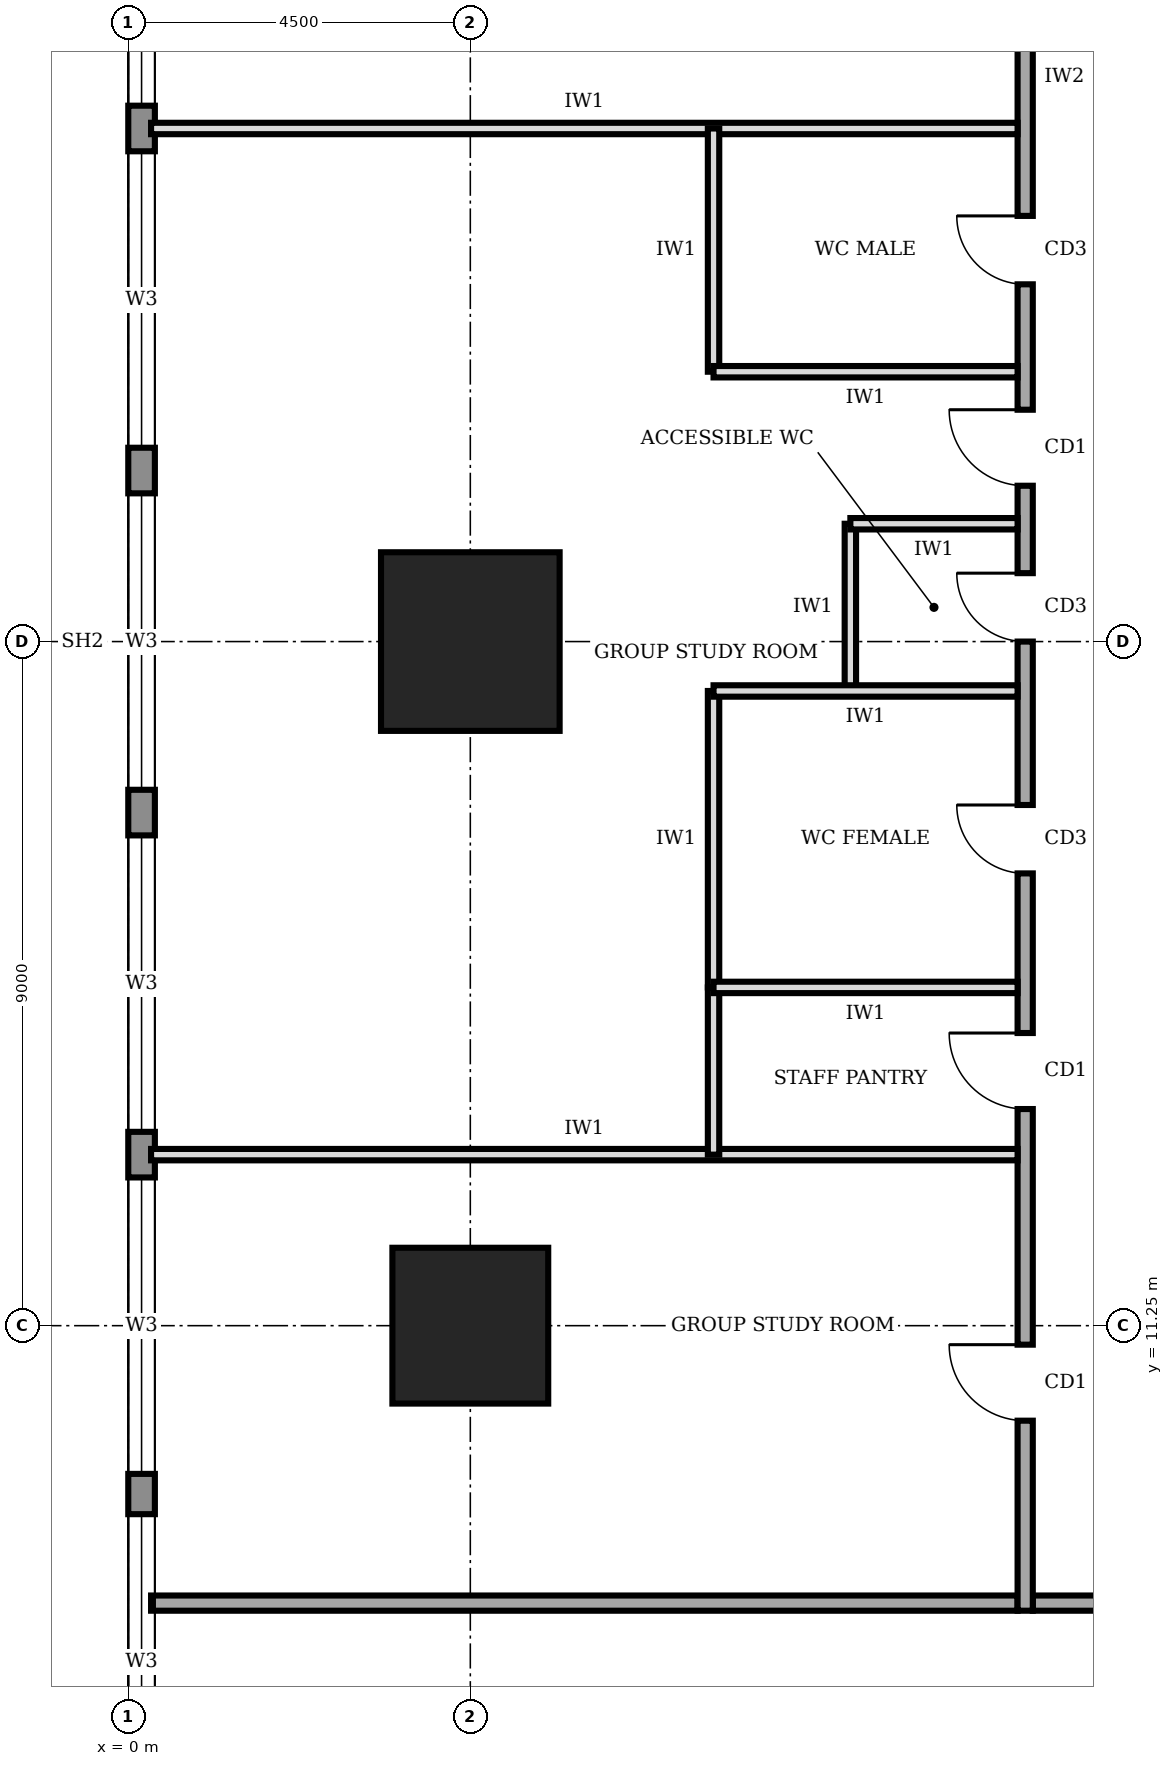
"""IFC4 building model, lengths in metres.
Left out: names, types, materials, properties, quantities, classifications, styles, units other than length and angle.
Written with IfcOpenShell. Run it as: python <this file> out.ifc"""

import sys

from ifc_helpers import new_model, si_unit, direction, frame, frame_2d, origin, origin_2d, place, context, subcontext, project, spatial, rectangle, extrude, element, fill, save


model = new_model("IFC4")
c1 = context("Model", 3, precision=1e-05, world=origin(), true_north=direction((0.0, 1.0)))
c2 = subcontext(c1, "Body", "Model", "MODEL_VIEW")
j1 = project(units=[si_unit("LENGTHUNIT", "METRE"), si_unit("PLANEANGLEUNIT", "RADIAN")], contexts=[c1])
p1 = place(None, origin())
s1 = spatial("IfcSite", under=j1, at=p1, CompositionType="ELEMENT")
p2 = place(p1, origin())
s2 = spatial("IfcBuilding", under=s1, at=p2, CompositionType="ELEMENT")
p3 = place(p2, frame((0.0, 0.0, 193.0)))
s3 = spatial("IfcBuildingStorey", under=s2, at=p3, CompositionType="ELEMENT", Elevation=193.0)
p4 = place(p3, frame((4.5, 11.25, 0.0), z_axis=(0.0, 0.0, 1.0), x_axis=(1.0, 0.0, 0.0)))
e1 = element("IfcColumn", 1, at=p4, inside=s3, PredefinedType="COLUMN", context=c2, shape_type="SweptSolid", body=[
    extrude(rectangle(XDim=2.05, YDim=2.05, at=origin_2d()), origin(), (0.0, 0.0, 1.0), 4.0),
])
p5 = place(p3, frame((4.5, 20.25, 0.0), z_axis=(0.0, 0.0, 1.0), x_axis=(1.0, 0.0, 0.0)))
e2 = element("IfcColumn", 2, at=p5, inside=s3, PredefinedType="COLUMN", context=c2, shape_type="SweptSolid", body=[
    extrude(rectangle(XDim=2.35, YDim=2.35, at=origin_2d()), origin(), (0.0, 0.0, 1.0), 4.0),
])
p6 = place(p3, frame((0.175, 35.98, 0.0), z_axis=(0.0, 0.0, 1.0), x_axis=(0.0, -1.0, 0.0)))
e3 = element("IfcWall", 3, at=p6, inside=s3, PredefinedType="STANDARD", context=c2, shape_type="SweptSolid", body=[
    extrude(rectangle(XDim=31.46, YDim=0.35, at=frame_2d((15.73, 0.0))), origin(), (0.0, 0.0, 1.0), 3.75),
])
p7 = place(p6, frame((27.21, 0.0, 0.95)))
e4 = element("IfcOpeningElement", 4, at=p7, cuts=e3, PredefinedType="OPENING", context=c2, shape_type="SweptSolid", body=[
    extrude(rectangle(XDim=3.9, YDim=1.8, at=frame_2d((1.95, 0.9))), frame((0.0, 0.185, 0.0), z_axis=(0.0, -1.0, 0.0), x_axis=(1.0, 0.0, 0.0)), (0.0, 0.0, 1.0), 0.37),
])
p8 = place(p6, frame((22.78, 0.0, 0.95)))
e5 = element("IfcOpeningElement", 5, at=p8, cuts=e3, PredefinedType="OPENING", context=c2, shape_type="SweptSolid", body=[
    extrude(rectangle(XDim=3.9, YDim=1.8, at=frame_2d((1.95, 0.9))), frame((0.0, 0.185, 0.0), z_axis=(0.0, -1.0, 0.0), x_axis=(1.0, 0.0, 0.0)), (0.0, 0.0, 1.0), 0.37),
])
p9 = place(p6, frame((18.28, 0.0, 0.95)))
e6 = element("IfcOpeningElement", 6, at=p9, cuts=e3, PredefinedType="OPENING", context=c2, shape_type="SweptSolid", body=[
    extrude(rectangle(XDim=3.9, YDim=1.8, at=frame_2d((1.95, 0.9))), frame((0.0, 0.185, 0.0), z_axis=(0.0, -1.0, 0.0), x_axis=(1.0, 0.0, 0.0)), (0.0, 0.0, 1.0), 0.37),
])
p10 = place(p6, frame((13.78, 0.0, 0.95)))
e7 = element("IfcOpeningElement", 7, at=p10, cuts=e3, PredefinedType="OPENING", context=c2, shape_type="SweptSolid", body=[
    extrude(rectangle(XDim=3.9, YDim=1.8, at=frame_2d((1.95, 0.9))), frame((0.0, 0.185, 0.0), z_axis=(0.0, -1.0, 0.0), x_axis=(1.0, 0.0, 0.0)), (0.0, 0.0, 1.0), 0.37),
])
p11 = place(p6, frame((9.28, 0.0, 0.95)))
e8 = element("IfcOpeningElement", 8, at=p11, cuts=e3, PredefinedType="OPENING", context=c2, shape_type="SweptSolid", body=[
    extrude(rectangle(XDim=3.9, YDim=1.8, at=frame_2d((1.95, 0.9))), frame((0.0, 0.185, 0.0), z_axis=(0.0, -1.0, 0.0), x_axis=(1.0, 0.0, 0.0)), (0.0, 0.0, 1.0), 0.37),
])
p12 = place(p6, frame((4.78, 0.0, 0.95)))
e9 = element("IfcOpeningElement", 9, at=p12, cuts=e3, PredefinedType="OPENING", context=c2, shape_type="SweptSolid", body=[
    extrude(rectangle(XDim=3.9, YDim=1.8, at=frame_2d((1.95, 0.9))), frame((0.0, 0.185, 0.0), z_axis=(0.0, -1.0, 0.0), x_axis=(1.0, 0.0, 0.0)), (0.0, 0.0, 1.0), 0.37),
])
p13 = place(p3, frame((11.9, 7.6, 0.0), z_axis=(0.0, 0.0, 1.0), x_axis=(1.0, 0.0, 0.0)))
e10 = element("IfcWall", 10, at=p13, inside=s3, PredefinedType="SOLIDWALL", context=c2, shape_type="SweptSolid", body=[
    extrude(rectangle(XDim=16.9, YDim=0.2, at=frame_2d((8.45, 0.0))), origin(), (0.0, 0.0, 1.0), 3.75),
])
p14 = place(p13, frame((2.05, 0.0, 0.0)))
e11 = element("IfcOpeningElement", 11, at=p14, cuts=e10, PredefinedType="OPENING", context=c2, shape_type="SweptSolid", body=[
    extrude(rectangle(XDim=1.8, YDim=2.1, at=frame_2d((0.9, 1.05))), frame((0.0, 0.11, 0.0), z_axis=(0.0, -1.0, 0.0), x_axis=(1.0, 0.0, 0.0)), (0.0, 0.0, 1.0), 0.22),
])
p15 = place(p13, frame((7.85, 0.0, 0.0)))
e12 = element("IfcOpeningElement", 12, at=p15, cuts=e10, PredefinedType="OPENING", context=c2, shape_type="SweptSolid", body=[
    extrude(rectangle(XDim=1.0, YDim=2.1, at=frame_2d((0.5, 1.05))), frame((0.0, 0.11, 0.0), z_axis=(0.0, -1.0, 0.0), x_axis=(1.0, 0.0, 0.0)), (0.0, 0.0, 1.0), 0.22),
])
p16 = place(p13, frame((12.85, 0.0, 0.0)))
e13 = element("IfcOpeningElement", 13, at=p16, cuts=e10, PredefinedType="OPENING", context=c2, shape_type="SweptSolid", body=[
    extrude(rectangle(XDim=1.8, YDim=2.1, at=frame_2d((0.9, 1.05))), frame((0.0, 0.11, 0.0), z_axis=(0.0, -1.0, 0.0), x_axis=(1.0, 0.0, 0.0)), (0.0, 0.0, 1.0), 0.22),
])
p17 = place(p3, frame((11.8, 32.8, 0.0), z_axis=(0.0, 0.0, 1.0), x_axis=(0.0, -1.0, 0.0)))
e14 = element("IfcWall", 14, at=p17, inside=s3, PredefinedType="SOLIDWALL", context=c2, shape_type="SweptSolid", body=[
    extrude(rectangle(XDim=25.3, YDim=0.2, at=frame_2d((12.65, 0.0))), origin(), (0.0, 0.0, 1.0), 3.75),
])
p18 = place(p17, frame((21.8, 0.0, 0.0)))
e15 = element("IfcOpeningElement", 15, at=p18, cuts=e14, PredefinedType="OPENING", context=c2, shape_type="SweptSolid", body=[
    extrude(rectangle(XDim=1.0, YDim=2.1, at=frame_2d((0.5, 1.05))), frame((0.0, 0.11, 0.0), z_axis=(0.0, -1.0, 0.0), x_axis=(1.0, 0.0, 0.0)), (0.0, 0.0, 1.0), 0.22),
])
p19 = place(p17, frame((17.7, 0.0, 0.0)))
e16 = element("IfcOpeningElement", 16, at=p19, cuts=e14, PredefinedType="OPENING", context=c2, shape_type="SweptSolid", body=[
    extrude(rectangle(XDim=1.0, YDim=2.1, at=frame_2d((0.5, 1.05))), frame((0.0, 0.11, 0.0), z_axis=(0.0, -1.0, 0.0), x_axis=(1.0, 0.0, 0.0)), (0.0, 0.0, 1.0), 0.22),
])
p20 = place(p17, frame((14.7, 0.0, 0.0)))
e17 = element("IfcOpeningElement", 17, at=p20, cuts=e14, PredefinedType="OPENING", context=c2, shape_type="SweptSolid", body=[
    extrude(rectangle(XDim=0.9, YDim=2.1, at=frame_2d((0.45, 1.05))), frame((0.0, 0.11, 0.0), z_axis=(0.0, -1.0, 0.0), x_axis=(1.0, 0.0, 0.0)), (0.0, 0.0, 1.0), 0.22),
])
p21 = place(p17, frame((11.65, 0.0, 0.0)))
e18 = element("IfcOpeningElement", 18, at=p21, cuts=e14, PredefinedType="OPENING", context=c2, shape_type="SweptSolid", body=[
    extrude(rectangle(XDim=0.9, YDim=2.1, at=frame_2d((0.45, 1.05))), frame((0.0, 0.11, 0.0), z_axis=(0.0, -1.0, 0.0), x_axis=(1.0, 0.0, 0.0)), (0.0, 0.0, 1.0), 0.22),
])
p22 = place(p17, frame((6.95, 0.0, 0.0)))
e19 = element("IfcOpeningElement", 19, at=p22, cuts=e14, PredefinedType="OPENING", context=c2, shape_type="SweptSolid", body=[
    extrude(rectangle(XDim=0.9, YDim=2.1, at=frame_2d((0.45, 1.05))), frame((0.0, 0.11, 0.0), z_axis=(0.0, -1.0, 0.0), x_axis=(1.0, 0.0, 0.0)), (0.0, 0.0, 1.0), 0.22),
])
p23 = place(p17, frame((9.5, 0.0, 0.0)))
e20 = element("IfcOpeningElement", 20, at=p23, cuts=e14, PredefinedType="OPENING", context=c2, shape_type="SweptSolid", body=[
    extrude(rectangle(XDim=1.0, YDim=2.1, at=frame_2d((0.5, 1.05))), frame((0.0, 0.11, 0.0), z_axis=(0.0, -1.0, 0.0), x_axis=(1.0, 0.0, 0.0)), (0.0, 0.0, 1.0), 0.22),
])
p24 = place(p17, frame((2.3, 0.0, 0.0)))
e21 = element("IfcOpeningElement", 21, at=p24, cuts=e14, PredefinedType="OPENING", context=c2, shape_type="SweptSolid", body=[
    extrude(rectangle(XDim=1.0, YDim=2.1, at=frame_2d((0.5, 1.05))), frame((0.0, 0.11, 0.0), z_axis=(0.0, -1.0, 0.0), x_axis=(1.0, 0.0, 0.0)), (0.0, 0.0, 1.0), 0.22),
])
p25 = place(p3, frame((0.3, 7.6, 0.0), z_axis=(0.0, 0.0, 1.0), x_axis=(1.0, 0.0, 0.0)))
e22 = element("IfcWall", 22, at=p25, inside=s3, PredefinedType="SOLIDWALL", context=c2, shape_type="SweptSolid", body=[
    extrude(rectangle(XDim=11.4, YDim=0.2, at=frame_2d((5.7, 0.0))), origin(), (0.0, 0.0, 1.0), 3.75),
])
for number, where, z_axis, x_axis in (
    (23, (0.3, 13.5, 0.0), (0.0, 0.0, 1.0), (1.0, 0.0, 0.0)),
    (24, (0.3, 27.0, 0.0), (0.0, 0.0, 1.0), (1.0, 0.0, 0.0)),
):
    element("IfcWall", number, at=place(p3, frame(where, z_axis=z_axis, x_axis=x_axis)), inside=s3, PredefinedType="PARTITIONING", context=c2, shape_type="SweptSolid", body=[
        extrude(rectangle(XDim=11.4, YDim=0.15, at=frame_2d((5.7, 0.0))), origin(), (0.0, 0.0, 1.0), 3.75),
    ])
p26 = place(p3, frame((11.7, 15.7, 0.0), z_axis=(0.0, 0.0, 1.0), x_axis=(-1.0, 0.0, 0.0)))
e25 = element("IfcWall", 25, at=p26, inside=s3, PredefinedType="PARTITIONING", context=c2, shape_type="SweptSolid", body=[
    extrude(rectangle(XDim=4.0, YDim=0.15, at=frame_2d((2.0, 0.0))), origin(), (0.0, 0.0, 1.0), 3.75),
])
p27 = place(p3, frame((11.7, 19.6, 0.0), z_axis=(0.0, 0.0, 1.0), x_axis=(-1.0, 0.0, 0.0)))
e26 = element("IfcWall", 26, at=p27, inside=s3, PredefinedType="PARTITIONING", context=c2, shape_type="SweptSolid", body=[
    extrude(rectangle(XDim=4.0, YDim=0.15, at=frame_2d((2.0, 0.0))), origin(), (0.0, 0.0, 1.0), 2.85),
])
p28 = place(p3, frame((11.7, 21.8, 0.0), z_axis=(0.0, 0.0, 1.0), x_axis=(-1.0, 0.0, 0.0)))
e27 = element("IfcWall", 27, at=p28, inside=s3, PredefinedType="PARTITIONING", context=c2, shape_type="SweptSolid", body=[
    extrude(rectangle(XDim=2.2, YDim=0.15, at=frame_2d((1.1, 0.0))), origin(), (0.0, 0.0, 1.0), 3.75),
])
p29 = place(p3, frame((11.7, 23.8, 0.0), z_axis=(0.0, 0.0, 1.0), x_axis=(-1.0, 0.0, 0.0)))
e28 = element("IfcWall", 28, at=p29, inside=s3, PredefinedType="PARTITIONING", context=c2, shape_type="SweptSolid", body=[
    extrude(rectangle(XDim=4.0, YDim=0.15, at=frame_2d((2.0, 0.0))), origin(), (0.0, 0.0, 1.0), 3.75),
])
p30 = place(p3, frame((7.7, 13.5, 0.0), z_axis=(0.0, 0.0, 1.0), x_axis=(0.0, 1.0, 0.0)))
e29 = element("IfcWall", 29, at=p30, inside=s3, PredefinedType="PARTITIONING", context=c2, shape_type="SweptSolid", body=[
    extrude(rectangle(XDim=2.2, YDim=0.15, at=frame_2d((1.1, 0.0))), origin(), (0.0, 0.0, 1.0), 3.75),
])
p31 = place(p3, frame((7.7, 15.7, 0.0), z_axis=(0.0, 0.0, 1.0), x_axis=(0.0, 1.0, 0.0)))
e30 = element("IfcWall", 30, at=p31, inside=s3, PredefinedType="PARTITIONING", context=c2, shape_type="SweptSolid", body=[
    extrude(rectangle(XDim=3.9, YDim=0.15, at=frame_2d((1.95, 0.0))), origin(), (0.0, 0.0, 1.0), 3.75),
])
p32 = place(p3, frame((9.5, 19.6, 0.0), z_axis=(0.0, 0.0, 1.0), x_axis=(0.0, 1.0, 0.0)))
e31 = element("IfcWall", 31, at=p32, inside=s3, PredefinedType="PARTITIONING", context=c2, shape_type="SweptSolid", body=[
    extrude(rectangle(XDim=2.2, YDim=0.15, at=frame_2d((1.1, 0.0))), origin(), (0.0, 0.0, 1.0), 3.75),
])
p33 = place(p3, frame((7.7, 23.8, 0.0), z_axis=(0.0, 0.0, 1.0), x_axis=(0.0, 1.0, 0.0)))
e32 = element("IfcWall", 32, at=p33, inside=s3, PredefinedType="PARTITIONING", context=c2, shape_type="SweptSolid", body=[
    extrude(rectangle(XDim=3.2, YDim=0.15, at=frame_2d((1.6, 0.0))), origin(), (0.0, 0.0, 1.0), 3.75),
])
p34 = place(p7, origin())
e33 = element("IfcWindow", 33, at=p34, inside=s3, PartitioningType="SINGLE_PANEL", PredefinedType="WINDOW", context=c2, shape_type="SweptSolid", body=[
    extrude(rectangle(XDim=3.9, YDim=1.8, at=frame_2d((1.95, 0.9))), frame((0.0, 0.03, 0.0), z_axis=(0.0, -1.0, 0.0), x_axis=(1.0, 0.0, 0.0)), (0.0, 0.0, 1.0), 0.06),
])
fill(e4, e33)
p35 = place(p8, origin())
e34 = element("IfcWindow", 34, at=p35, inside=s3, PartitioningType="SINGLE_PANEL", PredefinedType="WINDOW", context=c2, shape_type="SweptSolid", body=[
    extrude(rectangle(XDim=3.9, YDim=1.8, at=frame_2d((1.95, 0.9))), frame((0.0, 0.03, 0.0), z_axis=(0.0, -1.0, 0.0), x_axis=(1.0, 0.0, 0.0)), (0.0, 0.0, 1.0), 0.06),
])
fill(e5, e34)
p36 = place(p9, origin())
e35 = element("IfcWindow", 35, at=p36, inside=s3, PartitioningType="SINGLE_PANEL", PredefinedType="WINDOW", context=c2, shape_type="SweptSolid", body=[
    extrude(rectangle(XDim=3.9, YDim=1.8, at=frame_2d((1.95, 0.9))), frame((0.0, 0.03, 0.0), z_axis=(0.0, -1.0, 0.0), x_axis=(1.0, 0.0, 0.0)), (0.0, 0.0, 1.0), 0.06),
])
fill(e6, e35)
p37 = place(p10, origin())
e36 = element("IfcWindow", 36, at=p37, inside=s3, PartitioningType="SINGLE_PANEL", PredefinedType="WINDOW", context=c2, shape_type="SweptSolid", body=[
    extrude(rectangle(XDim=3.9, YDim=1.8, at=frame_2d((1.95, 0.9))), frame((0.0, 0.03, 0.0), z_axis=(0.0, -1.0, 0.0), x_axis=(1.0, 0.0, 0.0)), (0.0, 0.0, 1.0), 0.06),
])
fill(e7, e36)
p38 = place(p11, origin())
e37 = element("IfcWindow", 37, at=p38, inside=s3, PartitioningType="SINGLE_PANEL", PredefinedType="WINDOW", context=c2, shape_type="SweptSolid", body=[
    extrude(rectangle(XDim=3.9, YDim=1.8, at=frame_2d((1.95, 0.9))), frame((0.0, 0.03, 0.0), z_axis=(0.0, -1.0, 0.0), x_axis=(1.0, 0.0, 0.0)), (0.0, 0.0, 1.0), 0.06),
])
fill(e8, e37)
p39 = place(p12, origin())
e38 = element("IfcWindow", 38, at=p39, inside=s3, PartitioningType="SINGLE_PANEL", PredefinedType="WINDOW", context=c2, shape_type="SweptSolid", body=[
    extrude(rectangle(XDim=3.9, YDim=1.8, at=frame_2d((1.95, 0.9))), frame((0.0, 0.03, 0.0), z_axis=(0.0, -1.0, 0.0), x_axis=(1.0, 0.0, 0.0)), (0.0, 0.0, 1.0), 0.06),
])
fill(e9, e38)
p40 = place(p18, frame((1.0, 0.0, 0.0), z_axis=(0.0, 0.0, 1.0), x_axis=(-1.0, 0.0, 0.0)))
e39 = element("IfcDoor", 39, at=p40, inside=s3, OperationType="SINGLE_SWING_RIGHT", PredefinedType="DOOR", context=c2, shape_type="SweptSolid", body=[
    extrude(rectangle(XDim=1.0, YDim=2.1, at=frame_2d((0.5, 1.05))), frame((0.0, 0.025, 0.0), z_axis=(0.0, -1.0, 0.0), x_axis=(1.0, 0.0, 0.0)), (0.0, 0.0, 1.0), 0.05),
])
fill(e15, e39)
p41 = place(p19, frame((1.0, 0.0, 0.0), z_axis=(0.0, 0.0, 1.0), x_axis=(-1.0, 0.0, 0.0)))
e40 = element("IfcDoor", 40, at=p41, inside=s3, OperationType="SINGLE_SWING_RIGHT", PredefinedType="DOOR", context=c2, shape_type="SweptSolid", body=[
    extrude(rectangle(XDim=1.0, YDim=2.1, at=frame_2d((0.5, 1.05))), frame((0.0, 0.025, 0.0), z_axis=(0.0, -1.0, 0.0), x_axis=(1.0, 0.0, 0.0)), (0.0, 0.0, 1.0), 0.05),
])
fill(e16, e40)
p42 = place(p20, frame((0.9, 0.0, 0.0), z_axis=(0.0, 0.0, 1.0), x_axis=(-1.0, 0.0, 0.0)))
e41 = element("IfcDoor", 41, at=p42, inside=s3, OperationType="SINGLE_SWING_RIGHT", PredefinedType="DOOR", context=c2, shape_type="SweptSolid", body=[
    extrude(rectangle(XDim=0.9, YDim=2.1, at=frame_2d((0.45, 1.05))), frame((0.0, 0.025, 0.0), z_axis=(0.0, -1.0, 0.0), x_axis=(1.0, 0.0, 0.0)), (0.0, 0.0, 1.0), 0.05),
])
fill(e17, e41)
p43 = place(p21, frame((0.9, 0.0, 0.0), z_axis=(0.0, 0.0, 1.0), x_axis=(-1.0, 0.0, 0.0)))
e42 = element("IfcDoor", 42, at=p43, inside=s3, OperationType="SINGLE_SWING_RIGHT", PredefinedType="DOOR", context=c2, shape_type="SweptSolid", body=[
    extrude(rectangle(XDim=0.9, YDim=2.1, at=frame_2d((0.45, 1.05))), frame((0.0, 0.025, 0.0), z_axis=(0.0, -1.0, 0.0), x_axis=(1.0, 0.0, 0.0)), (0.0, 0.0, 1.0), 0.05),
])
fill(e18, e42)
p44 = place(p22, frame((0.9, 0.0, 0.0), z_axis=(0.0, 0.0, 1.0), x_axis=(-1.0, 0.0, 0.0)))
e43 = element("IfcDoor", 43, at=p44, inside=s3, OperationType="SINGLE_SWING_RIGHT", PredefinedType="DOOR", context=c2, shape_type="SweptSolid", body=[
    extrude(rectangle(XDim=0.9, YDim=2.1, at=frame_2d((0.45, 1.05))), frame((0.0, 0.025, 0.0), z_axis=(0.0, -1.0, 0.0), x_axis=(1.0, 0.0, 0.0)), (0.0, 0.0, 1.0), 0.05),
])
fill(e19, e43)
p45 = place(p23, frame((1.0, 0.0, 0.0), z_axis=(0.0, 0.0, 1.0), x_axis=(-1.0, 0.0, 0.0)))
e44 = element("IfcDoor", 44, at=p45, inside=s3, OperationType="SINGLE_SWING_RIGHT", PredefinedType="DOOR", context=c2, shape_type="SweptSolid", body=[
    extrude(rectangle(XDim=1.0, YDim=2.1, at=frame_2d((0.5, 1.05))), frame((0.0, 0.025, 0.0), z_axis=(0.0, -1.0, 0.0), x_axis=(1.0, 0.0, 0.0)), (0.0, 0.0, 1.0), 0.05),
])
fill(e20, e44)
save(model, sys.argv[1])
